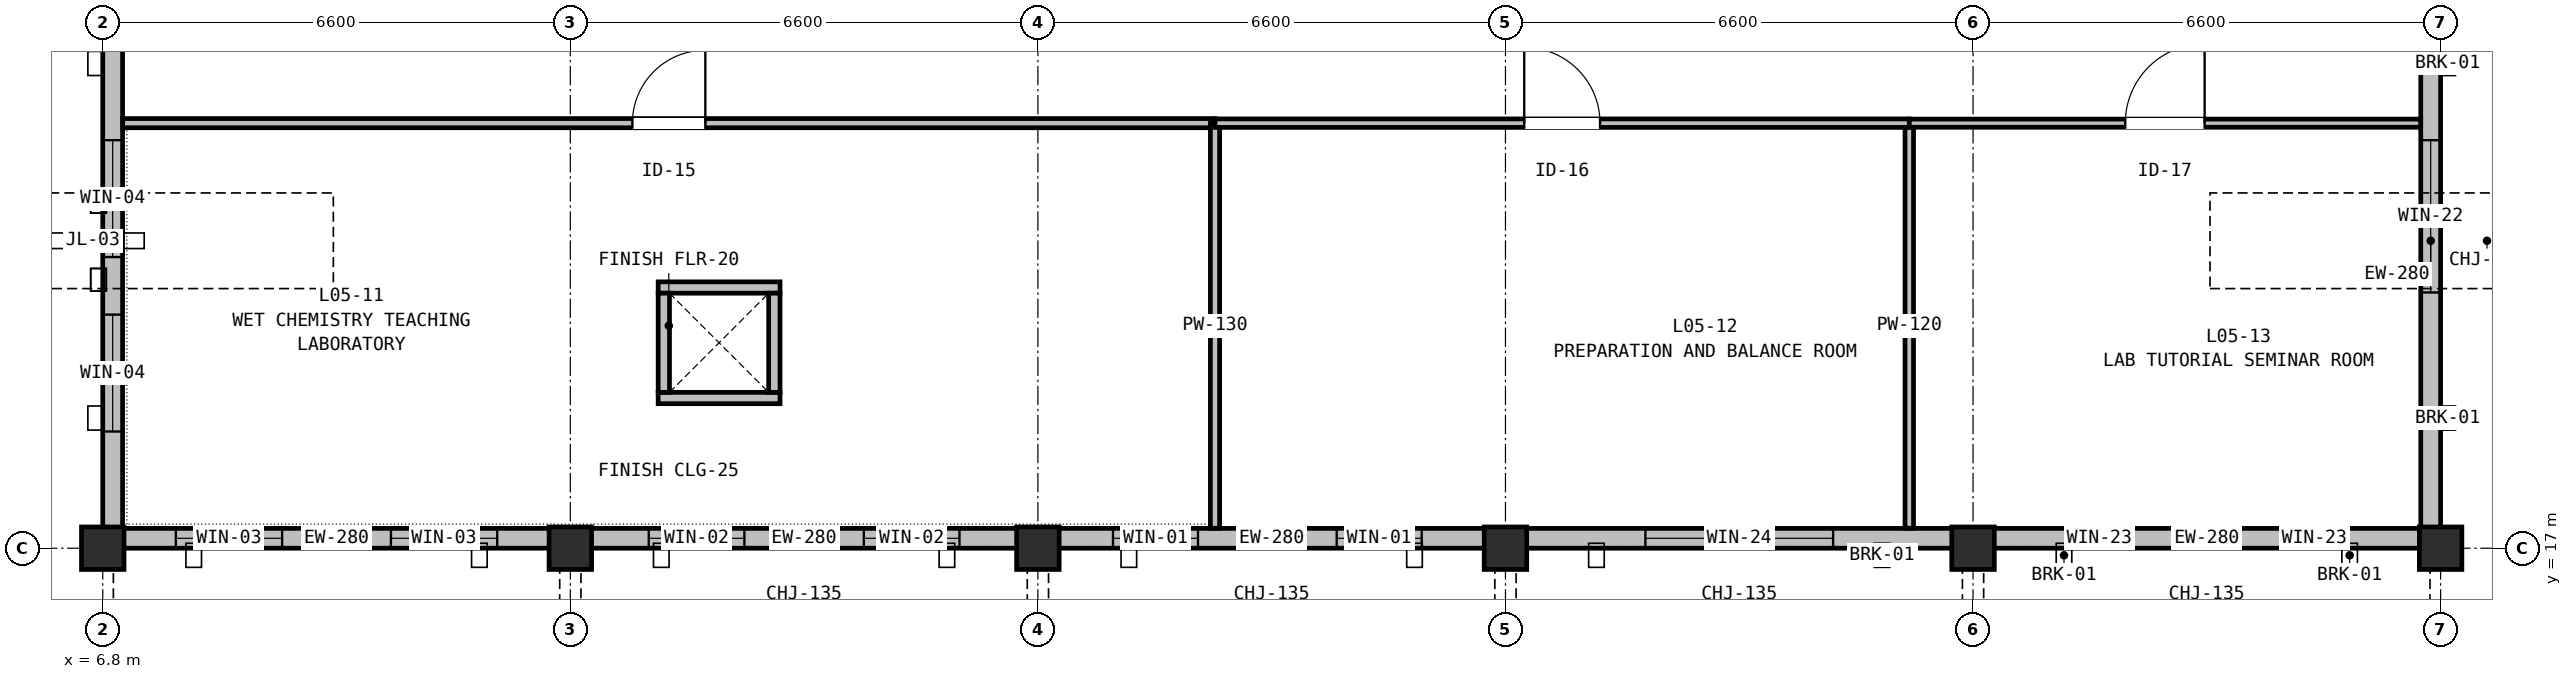
"""IFC4 building model, lengths in metres.
Left out: names, types, materials, properties, quantities, classifications, styles, units other than length and angle.
Written with IfcOpenShell. Run it as: python <this file> out.ifc"""

import sys

from ifc_helpers import new_model, si_unit, direction, frame, frame_2d, origin, origin_2d, place, context, subcontext, project, spatial, rectangle, extrude, element, fill, save


model = new_model("IFC4")
c1 = context("Model", 3, precision=1e-05, world=origin(), true_north=direction((0.0, 1.0)))
c2 = subcontext(c1, "Body", "Model", "MODEL_VIEW")
j1 = project(units=[si_unit("LENGTHUNIT", "METRE"), si_unit("PLANEANGLEUNIT", "RADIAN")], contexts=[c1])
p1 = place(None, origin())
s1 = spatial("IfcSite", under=j1, at=p1, CompositionType="ELEMENT")
p2 = place(p1, origin())
s2 = spatial("IfcBuilding", under=s1, at=p2, CompositionType="ELEMENT")
p3 = place(p2, frame((0.0, 0.0, 24.0)))
s3 = spatial("IfcBuildingStorey", under=s2, at=p3, CompositionType="ELEMENT", Elevation=24.0)
for number, where, z_axis, x_axis in (
    (1, (6.8, 17.0, 0.0), (0.0, 0.0, 1.0), (1.0, 0.0, 0.0)),
    (2, (13.4, 17.0, 0.0), (0.0, 0.0, 1.0), (1.0, 0.0, 0.0)),
    (3, (20.0, 17.0, 0.0), (0.0, 0.0, 1.0), (1.0, 0.0, 0.0)),
    (4, (26.6, 17.0, 0.0), (0.0, 0.0, 1.0), (1.0, 0.0, 0.0)),
    (5, (33.2, 17.0, 0.0), (0.0, 0.0, 1.0), (1.0, 0.0, 0.0)),
    (6, (39.8, 17.0, 0.0), (0.0, 0.0, 1.0), (1.0, 0.0, 0.0)),
):
    element("IfcColumn", number, at=place(p3, frame(where, z_axis=z_axis, x_axis=x_axis)), inside=s3, PredefinedType="COLUMN", context=c2, shape_type="SweptSolid", body=[
        extrude(rectangle(XDim=0.6, YDim=0.6, at=origin_2d()), origin(), (0.0, 0.0, 1.0), 4.44),
    ])
p4 = place(p3, frame((39.66, 25.4, 0.0), z_axis=(0.0, 0.0, 1.0), x_axis=(0.0, -1.0, 0.0)))
e7 = element("IfcWall", 7, at=p4, inside=s3, PredefinedType="STANDARD", context=c2, shape_type="SweptSolid", body=[
    extrude(rectangle(XDim=8.12, YDim=0.28, at=frame_2d((4.06, 0.0))), origin(), (0.0, 0.0, 1.0), 3.885),
])
p5 = place(p4, frame((2.64, 0.0, 0.75)))
e8 = element("IfcOpeningElement", 8, at=p5, cuts=e7, PredefinedType="OPENING", context=c2, shape_type="SweptSolid", body=[
    extrude(rectangle(XDim=2.15, YDim=2.4, at=frame_2d((1.075, 1.2))), frame((0.0, 0.15, 0.0), z_axis=(0.0, -1.0, 0.0), x_axis=(1.0, 0.0, 0.0)), (0.0, 0.0, 1.0), 0.3),
])
p6 = place(p3, frame((39.8, 17.14, 0.0), z_axis=(0.0, 0.0, 1.0), x_axis=(-1.0, 0.0, 0.0)))
e9 = element("IfcWall", 9, at=p6, inside=s3, PredefinedType="STANDARD", context=c2, shape_type="SweptSolid", body=[
    extrude(rectangle(XDim=6.6, YDim=0.28, at=frame_2d((3.3, 0.0))), origin(), (0.0, 0.0, 1.0), 3.735),
])
p7 = place(p6, frame((1.307, 0.0, 0.9)))
e10 = element("IfcOpeningElement", 10, at=p7, cuts=e9, PredefinedType="OPENING", context=c2, shape_type="SweptSolid", body=[
    extrude(rectangle(XDim=0.95, YDim=1.8, at=frame_2d((0.475, 0.9))), frame((0.0, 0.15, 0.0), z_axis=(0.0, -1.0, 0.0), x_axis=(1.0, 0.0, 0.0)), (0.0, 0.0, 1.0), 0.3),
])
p8 = place(p6, frame((4.343, 0.0, 0.9)))
e11 = element("IfcOpeningElement", 11, at=p8, cuts=e9, PredefinedType="OPENING", context=c2, shape_type="SweptSolid", body=[
    extrude(rectangle(XDim=0.95, YDim=1.8, at=frame_2d((0.475, 0.9))), frame((0.0, 0.15, 0.0), z_axis=(0.0, -1.0, 0.0), x_axis=(1.0, 0.0, 0.0)), (0.0, 0.0, 1.0), 0.3),
])
p9 = place(p3, frame((33.2, 17.14, 0.0), z_axis=(0.0, 0.0, 1.0), x_axis=(-1.0, 0.0, 0.0)))
e12 = element("IfcWall", 12, at=p9, inside=s3, PredefinedType="STANDARD", context=c2, shape_type="SweptSolid", body=[
    extrude(rectangle(XDim=6.6, YDim=0.28, at=frame_2d((3.3, 0.0))), origin(), (0.0, 0.0, 1.0), 3.735),
])
p10 = place(p9, frame((1.975, 0.0, 0.9)))
e13 = element("IfcOpeningElement", 13, at=p10, cuts=e12, PredefinedType="OPENING", context=c2, shape_type="SweptSolid", body=[
    extrude(rectangle(XDim=2.65, YDim=1.85, at=frame_2d((1.325, 0.925))), frame((0.0, 0.15, 0.0), z_axis=(0.0, -1.0, 0.0), x_axis=(1.0, 0.0, 0.0)), (0.0, 0.0, 1.0), 0.3),
])
p11 = place(p3, frame((26.6, 17.14, 0.0), z_axis=(0.0, 0.0, 1.0), x_axis=(-1.0, 0.0, 0.0)))
e14 = element("IfcWall", 14, at=p11, inside=s3, PredefinedType="STANDARD", context=c2, shape_type="SweptSolid", body=[
    extrude(rectangle(XDim=6.6, YDim=0.28, at=frame_2d((3.3, 0.0))), origin(), (0.0, 0.0, 1.0), 3.735),
])
p12 = place(p11, frame((1.182, 0.0, 0.9)))
e15 = element("IfcOpeningElement", 15, at=p12, cuts=e14, PredefinedType="OPENING", context=c2, shape_type="SweptSolid", body=[
    extrude(rectangle(XDim=1.2, YDim=2.1, at=frame_2d((0.6, 1.05))), frame((0.0, 0.15, 0.0), z_axis=(0.0, -1.0, 0.0), x_axis=(1.0, 0.0, 0.0)), (0.0, 0.0, 1.0), 0.3),
])
p13 = place(p11, frame((4.34, 0.0, 0.9)))
e16 = element("IfcOpeningElement", 16, at=p13, cuts=e14, PredefinedType="OPENING", context=c2, shape_type="SweptSolid", body=[
    extrude(rectangle(XDim=1.2, YDim=2.1, at=frame_2d((0.6, 1.05))), frame((0.0, 0.15, 0.0), z_axis=(0.0, -1.0, 0.0), x_axis=(1.0, 0.0, 0.0)), (0.0, 0.0, 1.0), 0.3),
])
p14 = place(p3, frame((20.0, 17.14, 0.0), z_axis=(0.0, 0.0, 1.0), x_axis=(-1.0, 0.0, 0.0)))
e17 = element("IfcWall", 17, at=p14, inside=s3, PredefinedType="STANDARD", context=c2, shape_type="SweptSolid", body=[
    extrude(rectangle(XDim=6.6, YDim=0.28, at=frame_2d((3.3, 0.0))), origin(), (0.0, 0.0, 1.0), 3.735),
])
p15 = place(p14, frame((1.107, 0.0, 0.9)))
e18 = element("IfcOpeningElement", 18, at=p15, cuts=e17, PredefinedType="OPENING", context=c2, shape_type="SweptSolid", body=[
    extrude(rectangle(XDim=1.35, YDim=2.1, at=frame_2d((0.675, 1.05))), frame((0.0, 0.15, 0.0), z_axis=(0.0, -1.0, 0.0), x_axis=(1.0, 0.0, 0.0)), (0.0, 0.0, 1.0), 0.3),
])
p16 = place(p14, frame((4.143, 0.0, 0.9)))
e19 = element("IfcOpeningElement", 19, at=p16, cuts=e17, PredefinedType="OPENING", context=c2, shape_type="SweptSolid", body=[
    extrude(rectangle(XDim=1.35, YDim=2.1, at=frame_2d((0.675, 1.05))), frame((0.0, 0.15, 0.0), z_axis=(0.0, -1.0, 0.0), x_axis=(1.0, 0.0, 0.0)), (0.0, 0.0, 1.0), 0.3),
])
p17 = place(p3, frame((13.4, 17.14, 0.0), z_axis=(0.0, 0.0, 1.0), x_axis=(-1.0, 0.0, 0.0)))
e20 = element("IfcWall", 20, at=p17, inside=s3, PredefinedType="STANDARD", context=c2, shape_type="SweptSolid", body=[
    extrude(rectangle(XDim=6.6, YDim=0.28, at=frame_2d((3.3, 0.0))), origin(), (0.0, 0.0, 1.0), 3.735),
])
p18 = place(p17, frame((1.032, 0.0, 0.9)))
e21 = element("IfcOpeningElement", 21, at=p18, cuts=e20, PredefinedType="OPENING", context=c2, shape_type="SweptSolid", body=[
    extrude(rectangle(XDim=1.5, YDim=2.1, at=frame_2d((0.75, 1.05))), frame((0.0, 0.15, 0.0), z_axis=(0.0, -1.0, 0.0), x_axis=(1.0, 0.0, 0.0)), (0.0, 0.0, 1.0), 0.3),
])
p19 = place(p17, frame((4.068, 0.0, 0.9)))
e22 = element("IfcOpeningElement", 22, at=p19, cuts=e20, PredefinedType="OPENING", context=c2, shape_type="SweptSolid", body=[
    extrude(rectangle(XDim=1.5, YDim=2.1, at=frame_2d((0.75, 1.05))), frame((0.0, 0.15, 0.0), z_axis=(0.0, -1.0, 0.0), x_axis=(1.0, 0.0, 0.0)), (0.0, 0.0, 1.0), 0.3),
])
p20 = place(p3, frame((6.94, 17.28, 0.0), z_axis=(0.0, 0.0, 1.0), x_axis=(0.0, 1.0, 0.0)))
e23 = element("IfcWall", 23, at=p20, inside=s3, PredefinedType="STANDARD", context=c2, shape_type="SweptSolid", body=[
    extrude(rectangle(XDim=8.12, YDim=0.28, at=frame_2d((4.06, 0.0))), origin(), (0.0, 0.0, 1.0), 3.885),
])
p21 = place(p20, frame((1.367, 0.0, 0.9)))
e24 = element("IfcOpeningElement", 24, at=p21, cuts=e23, PredefinedType="OPENING", context=c2, shape_type="SweptSolid", body=[
    extrude(rectangle(XDim=1.65, YDim=2.1, at=frame_2d((0.825, 1.05))), frame((0.0, 0.15, 0.0), z_axis=(0.0, -1.0, 0.0), x_axis=(1.0, 0.0, 0.0)), (0.0, 0.0, 1.0), 0.3),
])
p22 = place(p20, frame((3.83, 0.0, 0.9)))
e25 = element("IfcOpeningElement", 25, at=p22, cuts=e23, PredefinedType="OPENING", context=c2, shape_type="SweptSolid", body=[
    extrude(rectangle(XDim=1.65, YDim=2.1, at=frame_2d((0.825, 1.05))), frame((0.0, 0.15, 0.0), z_axis=(0.0, -1.0, 0.0), x_axis=(1.0, 0.0, 0.0)), (0.0, 0.0, 1.0), 0.3),
])
for number, where, z_axis, x_axis in (
    (26, (14.64, 19.12, 0.0), (0.0, 0.0, 1.0), (1.0, 0.0, 0.0)),
    (27, (14.64, 20.68, 0.0), (0.0, 0.0, 1.0), (1.0, 0.0, 0.0)),
):
    element("IfcWall", number, at=place(p3, frame(where, z_axis=z_axis, x_axis=x_axis)), inside=s3, PredefinedType="PARTITIONING", context=c2, shape_type="SweptSolid", body=[
        extrude(rectangle(XDim=1.72, YDim=0.16, at=frame_2d((0.86, 0.0))), origin(), (0.0, 0.0, 1.0), 4.215),
    ])
for number, where, z_axis, x_axis in (
    (28, (14.72, 19.2, 0.0), (0.0, 0.0, 1.0), (0.0, 1.0, 0.0)),
    (29, (16.28, 19.2, 0.0), (0.0, 0.0, 1.0), (0.0, 1.0, 0.0)),
):
    element("IfcWall", number, at=place(p3, frame(where, z_axis=z_axis, x_axis=x_axis)), inside=s3, PredefinedType="PARTITIONING", context=c2, shape_type="SweptSolid", body=[
        extrude(rectangle(XDim=1.4, YDim=0.16, at=frame_2d((0.7, 0.0))), origin(), (0.0, 0.0, 1.0), 4.215),
    ])
p23 = place(p3, frame((7.082, 23.0, 0.0), z_axis=(0.0, 0.0, 1.0), x_axis=(1.0, 0.0, 0.0)))
e30 = element("IfcWall", 30, at=p23, inside=s3, PredefinedType="PARTITIONING", context=c2, shape_type="SweptSolid", body=[
    extrude(rectangle(XDim=15.418, YDim=0.13, at=frame_2d((7.709, 0.0))), origin(), (0.0, 0.0, 1.0), 3.735),
])
p24 = place(p23, frame((7.194, 0.0, 0.0)))
e31 = element("IfcOpeningElement", 31, at=p24, cuts=e30, PredefinedType="OPENING", context=c2, shape_type="SweptSolid", body=[
    extrude(rectangle(XDim=1.03, YDim=2.1, at=frame_2d((0.515, 1.05))), frame((0.0, 0.075, 0.0), z_axis=(0.0, -1.0, 0.0), x_axis=(1.0, 0.0, 0.0)), (0.0, 0.0, 1.0), 0.15),
])
p25 = place(p3, frame((22.5, 23.0, 0.0), z_axis=(0.0, 0.0, 1.0), x_axis=(0.0, -1.0, 0.0)))
e32 = element("IfcWall", 32, at=p25, inside=s3, PredefinedType="PARTITIONING", context=c2, shape_type="SweptSolid", body=[
    extrude(rectangle(XDim=5.718, YDim=0.13, at=frame_2d((2.859, 0.0))), origin(), (0.0, 0.0, 1.0), 4.215),
])
p26 = place(p3, frame((32.3, 23.0, 0.0), z_axis=(0.0, 0.0, 1.0), x_axis=(0.0, -1.0, 0.0)))
e33 = element("IfcWall", 33, at=p26, inside=s3, PredefinedType="PARTITIONING", context=c2, shape_type="SweptSolid", body=[
    extrude(rectangle(XDim=5.718, YDim=0.12, at=frame_2d((2.859, 0.0))), origin(), (0.0, 0.0, 1.0), 4.215),
])
p27 = place(p3, frame((22.5, 23.0, 0.0), z_axis=(0.0, 0.0, 1.0), x_axis=(1.0, 0.0, 0.0)))
e34 = element("IfcWall", 34, at=p27, inside=s3, PredefinedType="PARTITIONING", context=c2, shape_type="SweptSolid", body=[
    extrude(rectangle(XDim=9.8, YDim=0.12, at=frame_2d((4.9, 0.0))), origin(), (0.0, 0.0, 1.0), 3.735),
])
p28 = place(p27, frame((4.365, 0.0, 0.0)))
e35 = element("IfcOpeningElement", 35, at=p28, cuts=e34, PredefinedType="OPENING", context=c2, shape_type="SweptSolid", body=[
    extrude(rectangle(XDim=1.07, YDim=2.1, at=frame_2d((0.535, 1.05))), frame((0.0, 0.07, 0.0), z_axis=(0.0, -1.0, 0.0), x_axis=(1.0, 0.0, 0.0)), (0.0, 0.0, 1.0), 0.14),
])
p29 = place(p3, frame((32.3, 23.0, 0.0), z_axis=(0.0, 0.0, 1.0), x_axis=(1.0, 0.0, 0.0)))
e36 = element("IfcWall", 36, at=p29, inside=s3, PredefinedType="PARTITIONING", context=c2, shape_type="SweptSolid", body=[
    extrude(rectangle(XDim=7.218, YDim=0.115, at=frame_2d((3.609, 0.0))), origin(), (0.0, 0.0, 1.0), 3.735),
])
p30 = place(p29, frame((3.049, 0.0, 0.0)))
e37 = element("IfcOpeningElement", 37, at=p30, cuts=e36, PredefinedType="OPENING", context=c2, shape_type="SweptSolid", body=[
    extrude(rectangle(XDim=1.12, YDim=2.1, at=frame_2d((0.56, 1.05))), frame((0.0, 0.067, 0.0), z_axis=(0.0, -1.0, 0.0), x_axis=(1.0, 0.0, 0.0)), (0.0, 0.0, 1.0), 0.135),
])
p31 = place(p5, origin())
e38 = element("IfcWindow", 38, at=p31, inside=s3, PartitioningType="SINGLE_PANEL", PredefinedType="WINDOW", context=c2, shape_type="SweptSolid", body=[
    extrude(rectangle(XDim=2.15, YDim=2.4, at=frame_2d((1.075, 1.2))), frame((0.0, 0.03, 0.0), z_axis=(0.0, -1.0, 0.0), x_axis=(1.0, 0.0, 0.0)), (0.0, 0.0, 1.0), 0.06),
])
fill(e8, e38)
p32 = place(p7, origin())
e39 = element("IfcWindow", 39, at=p32, inside=s3, PartitioningType="SINGLE_PANEL", PredefinedType="WINDOW", context=c2, shape_type="SweptSolid", body=[
    extrude(rectangle(XDim=0.95, YDim=1.8, at=frame_2d((0.475, 0.9))), frame((0.0, 0.03, 0.0), z_axis=(0.0, -1.0, 0.0), x_axis=(1.0, 0.0, 0.0)), (0.0, 0.0, 1.0), 0.06),
])
fill(e10, e39)
p33 = place(p8, origin())
e40 = element("IfcWindow", 40, at=p33, inside=s3, PartitioningType="SINGLE_PANEL", PredefinedType="WINDOW", context=c2, shape_type="SweptSolid", body=[
    extrude(rectangle(XDim=0.95, YDim=1.8, at=frame_2d((0.475, 0.9))), frame((0.0, 0.03, 0.0), z_axis=(0.0, -1.0, 0.0), x_axis=(1.0, 0.0, 0.0)), (0.0, 0.0, 1.0), 0.06),
])
fill(e11, e40)
p34 = place(p10, origin())
e41 = element("IfcWindow", 41, at=p34, inside=s3, PartitioningType="SINGLE_PANEL", PredefinedType="WINDOW", context=c2, shape_type="SweptSolid", body=[
    extrude(rectangle(XDim=2.65, YDim=1.85, at=frame_2d((1.325, 0.925))), frame((0.0, 0.03, 0.0), z_axis=(0.0, -1.0, 0.0), x_axis=(1.0, 0.0, 0.0)), (0.0, 0.0, 1.0), 0.06),
])
fill(e13, e41)
p35 = place(p12, origin())
e42 = element("IfcWindow", 42, at=p35, inside=s3, PartitioningType="SINGLE_PANEL", PredefinedType="WINDOW", context=c2, shape_type="SweptSolid", body=[
    extrude(rectangle(XDim=1.2, YDim=2.1, at=frame_2d((0.6, 1.05))), frame((0.0, 0.03, 0.0), z_axis=(0.0, -1.0, 0.0), x_axis=(1.0, 0.0, 0.0)), (0.0, 0.0, 1.0), 0.06),
])
fill(e15, e42)
p36 = place(p13, origin())
e43 = element("IfcWindow", 43, at=p36, inside=s3, PartitioningType="SINGLE_PANEL", PredefinedType="WINDOW", context=c2, shape_type="SweptSolid", body=[
    extrude(rectangle(XDim=1.2, YDim=2.1, at=frame_2d((0.6, 1.05))), frame((0.0, 0.03, 0.0), z_axis=(0.0, -1.0, 0.0), x_axis=(1.0, 0.0, 0.0)), (0.0, 0.0, 1.0), 0.06),
])
fill(e16, e43)
p37 = place(p15, origin())
e44 = element("IfcWindow", 44, at=p37, inside=s3, PartitioningType="SINGLE_PANEL", PredefinedType="WINDOW", context=c2, shape_type="SweptSolid", body=[
    extrude(rectangle(XDim=1.35, YDim=2.1, at=frame_2d((0.675, 1.05))), frame((0.0, 0.03, 0.0), z_axis=(0.0, -1.0, 0.0), x_axis=(1.0, 0.0, 0.0)), (0.0, 0.0, 1.0), 0.06),
])
fill(e18, e44)
p38 = place(p16, origin())
e45 = element("IfcWindow", 45, at=p38, inside=s3, PartitioningType="SINGLE_PANEL", PredefinedType="WINDOW", context=c2, shape_type="SweptSolid", body=[
    extrude(rectangle(XDim=1.35, YDim=2.1, at=frame_2d((0.675, 1.05))), frame((0.0, 0.03, 0.0), z_axis=(0.0, -1.0, 0.0), x_axis=(1.0, 0.0, 0.0)), (0.0, 0.0, 1.0), 0.06),
])
fill(e19, e45)
p39 = place(p18, origin())
e46 = element("IfcWindow", 46, at=p39, inside=s3, PartitioningType="SINGLE_PANEL", PredefinedType="WINDOW", context=c2, shape_type="SweptSolid", body=[
    extrude(rectangle(XDim=1.5, YDim=2.1, at=frame_2d((0.75, 1.05))), frame((0.0, 0.03, 0.0), z_axis=(0.0, -1.0, 0.0), x_axis=(1.0, 0.0, 0.0)), (0.0, 0.0, 1.0), 0.06),
])
fill(e21, e46)
p40 = place(p19, origin())
e47 = element("IfcWindow", 47, at=p40, inside=s3, PartitioningType="SINGLE_PANEL", PredefinedType="WINDOW", context=c2, shape_type="SweptSolid", body=[
    extrude(rectangle(XDim=1.5, YDim=2.1, at=frame_2d((0.75, 1.05))), frame((0.0, 0.03, 0.0), z_axis=(0.0, -1.0, 0.0), x_axis=(1.0, 0.0, 0.0)), (0.0, 0.0, 1.0), 0.06),
])
fill(e22, e47)
p41 = place(p21, origin())
e48 = element("IfcWindow", 48, at=p41, inside=s3, PartitioningType="SINGLE_PANEL", PredefinedType="WINDOW", context=c2, shape_type="SweptSolid", body=[
    extrude(rectangle(XDim=1.65, YDim=2.1, at=frame_2d((0.825, 1.05))), frame((0.0, 0.03, 0.0), z_axis=(0.0, -1.0, 0.0), x_axis=(1.0, 0.0, 0.0)), (0.0, 0.0, 1.0), 0.06),
])
fill(e24, e48)
p42 = place(p22, origin())
e49 = element("IfcWindow", 49, at=p42, inside=s3, PartitioningType="SINGLE_PANEL", PredefinedType="WINDOW", context=c2, shape_type="SweptSolid", body=[
    extrude(rectangle(XDim=1.65, YDim=2.1, at=frame_2d((0.825, 1.05))), frame((0.0, 0.03, 0.0), z_axis=(0.0, -1.0, 0.0), x_axis=(1.0, 0.0, 0.0)), (0.0, 0.0, 1.0), 0.06),
])
fill(e25, e49)
p43 = place(p24, origin())
e50 = element("IfcDoor", 50, at=p43, inside=s3, OperationType="SINGLE_SWING_RIGHT", PredefinedType="DOOR", context=c2, shape_type="SweptSolid", body=[
    extrude(rectangle(XDim=1.03, YDim=2.1, at=frame_2d((0.515, 1.05))), frame((0.0, 0.025, 0.0), z_axis=(0.0, -1.0, 0.0), x_axis=(1.0, 0.0, 0.0)), (0.0, 0.0, 1.0), 0.05),
])
fill(e31, e50)
p44 = place(p28, origin())
e51 = element("IfcDoor", 51, at=p44, inside=s3, OperationType="SINGLE_SWING_LEFT", PredefinedType="DOOR", context=c2, shape_type="SweptSolid", body=[
    extrude(rectangle(XDim=1.07, YDim=2.1, at=frame_2d((0.535, 1.05))), frame((0.0, 0.025, 0.0), z_axis=(0.0, -1.0, 0.0), x_axis=(1.0, 0.0, 0.0)), (0.0, 0.0, 1.0), 0.05),
])
fill(e35, e51)
p45 = place(p30, origin())
e52 = element("IfcDoor", 52, at=p45, inside=s3, OperationType="SINGLE_SWING_RIGHT", PredefinedType="DOOR", context=c2, shape_type="SweptSolid", body=[
    extrude(rectangle(XDim=1.12, YDim=2.1, at=frame_2d((0.56, 1.05))), frame((0.0, 0.025, 0.0), z_axis=(0.0, -1.0, 0.0), x_axis=(1.0, 0.0, 0.0)), (0.0, 0.0, 1.0), 0.05),
])
fill(e37, e52)
save(model, sys.argv[1])
